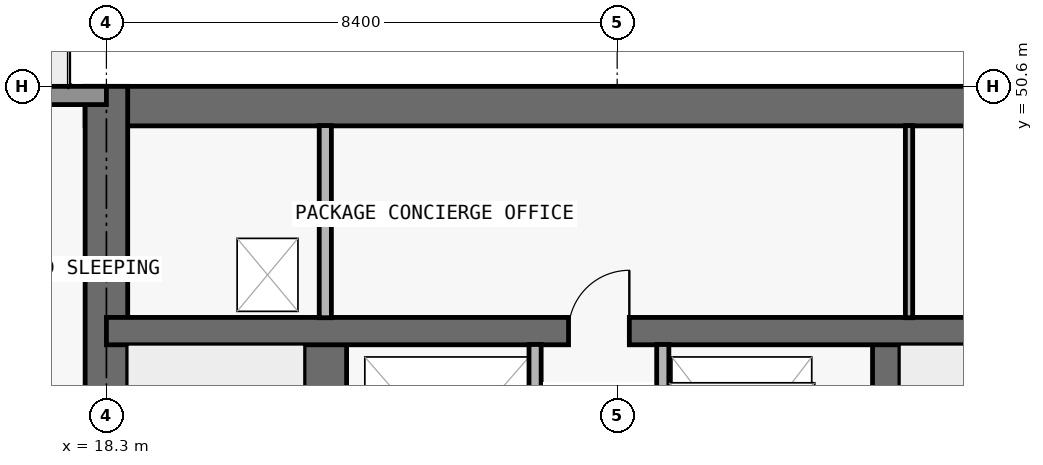
"""IFC4 building model, lengths in metres.
Left out: names, types, materials, properties, quantities, classifications, styles, units other than length and angle.
Written with IfcOpenShell. Run it as: python <this file> out.ifc"""

import sys

from ifc_helpers import new_model, si_unit, direction, frame, frame_2d, origin, place, context, subcontext, project, spatial, rectangle, extrude, element, fill, save


model = new_model("IFC4")
c1 = context("Model", 3, precision=1e-05, world=origin(), true_north=direction((0.0, 1.0)))
c2 = subcontext(c1, "Body", "Model", "MODEL_VIEW")
j1 = project(units=[si_unit("LENGTHUNIT", "METRE"), si_unit("PLANEANGLEUNIT", "RADIAN")], contexts=[c1])
p1 = place(None, origin())
s1 = spatial("IfcSite", under=j1, at=p1, CompositionType="ELEMENT")
p2 = place(p1, origin())
s2 = spatial("IfcBuilding", under=s1, at=p2, CompositionType="ELEMENT")
p3 = place(p2, frame((0.0, 0.0, 204.9)))
s3 = spatial("IfcBuildingStorey", under=s2, at=p3, CompositionType="ELEMENT", Elevation=204.9)
p4 = place(p3, frame((17.95, 50.275, 0.0), z_axis=(0.0, 0.0, 1.0), x_axis=(1.0, 0.0, 0.0)))
e1 = element("IfcWall", 1, at=p4, inside=s3, PredefinedType="SHEAR", context=c2, shape_type="SweptSolid", body=[
    extrude(rectangle(XDim=41.9, YDim=0.65, at=frame_2d((20.95, 0.0))), origin(), (0.0, 0.0, 1.0), 3.05),
])
p5 = place(p3, frame((18.3, 36.65, 0.0), z_axis=(0.0, 0.0, 1.0), x_axis=(0.0, 1.0, 0.0)))
e2 = element("IfcWall", 2, at=p5, inside=s3, PredefinedType="SHEAR", context=c2, shape_type="SweptSolid", body=[
    extrude(rectangle(XDim=13.95, YDim=0.7, at=frame_2d((6.975, 0.0))), origin(), (0.0, 0.0, 1.0), 3.05),
])
p6 = place(p3, frame((21.9, 37.0, 0.0), z_axis=(0.0, 0.0, 1.0), x_axis=(0.0, 1.0, 0.0)))
e3 = element("IfcWall", 3, at=p6, inside=s3, PredefinedType="SHEAR", context=c2, shape_type="SweptSolid", body=[
    extrude(rectangle(XDim=9.575, YDim=0.7, at=frame_2d((4.788, 0.0))), origin(), (0.0, 0.0, 1.0), 3.05),
])
p7 = place(p6, frame((0.55, 0.0, 0.0)))
e4 = element("IfcOpeningElement", 4, at=p7, cuts=e3, PredefinedType="OPENING", context=c2, shape_type="SweptSolid", body=[
    extrude(rectangle(XDim=1.1, YDim=2.15, at=frame_2d((0.55, 1.075))), frame((0.0, 0.36, 0.0), z_axis=(0.0, -1.0, 0.0), x_axis=(1.0, 0.0, 0.0)), (0.0, 0.0, 1.0), 0.72),
])
p8 = place(p3, frame((31.125, 37.0, 0.0), z_axis=(0.0, 0.0, 1.0), x_axis=(0.0, 1.0, 0.0)))
e5 = element("IfcWall", 5, at=p8, inside=s3, PredefinedType="SHEAR", context=c2, shape_type="SweptSolid", body=[
    extrude(rectangle(XDim=9.575, YDim=0.45, at=frame_2d((4.788, 0.0))), origin(), (0.0, 0.0, 1.0), 3.05),
])
p9 = place(p3, frame((18.3, 46.575, 0.0), z_axis=(0.0, 0.0, 1.0), x_axis=(1.0, 0.0, 0.0)))
e6 = element("IfcWall", 6, at=p9, inside=s3, PredefinedType="SHEAR", context=c2, shape_type="SweptSolid", body=[
    extrude(rectangle(XDim=41.2, YDim=0.45, at=frame_2d((20.6, 0.0))), origin(), (0.0, 0.0, 1.0), 3.05),
])
p10 = place(p9, frame((7.6, 0.0, 0.0)))
e7 = element("IfcOpeningElement", 7, at=p10, cuts=e6, PredefinedType="OPENING", context=c2, shape_type="SweptSolid", body=[
    extrude(rectangle(XDim=1.0, YDim=2.2, at=frame_2d((0.5, 1.1))), frame((0.0, 0.235, 0.0), z_axis=(0.0, -1.0, 0.0), x_axis=(1.0, 0.0, 0.0)), (0.0, 0.0, 1.0), 0.47),
])
p11 = place(p9, frame((32.625, 0.0, 0.0)))
e8 = element("IfcOpeningElement", 8, at=p11, cuts=e6, PredefinedType="OPENING", context=c2, shape_type="SweptSolid", body=[
    extrude(rectangle(XDim=1.05, YDim=2.15, at=frame_2d((0.525, 1.075))), frame((0.0, 0.235, 0.0), z_axis=(0.0, -1.0, 0.0), x_axis=(1.0, 0.0, 0.0)), (0.0, 0.0, 1.0), 0.47),
])
p12 = place(p3, frame((10.1, 50.45, 0.0), z_axis=(0.0, 0.0, 1.0), x_axis=(1.0, 0.0, 0.0)))
e9 = element("IfcWall", 9, at=p12, inside=s3, PredefinedType="STANDARD", context=c2, shape_type="SweptSolid", body=[
    extrude(rectangle(XDim=8.2, YDim=0.3, at=frame_2d((4.1, 0.0))), origin(), (0.0, 0.0, 1.0), 3.05),
])
p13 = place(p12, frame((3.1, 0.0, 0.0)))
e10 = element("IfcOpeningElement", 10, at=p13, cuts=e9, PredefinedType="OPENING", context=c2, shape_type="SweptSolid", body=[
    extrude(rectangle(XDim=2.0, YDim=2.3, at=frame_2d((1.0, 1.15))), frame((0.0, 0.16, 0.0), z_axis=(0.0, -1.0, 0.0), x_axis=(1.0, 0.0, 0.0)), (0.0, 0.0, 1.0), 0.32),
])
p14 = place(p3, frame((21.9, 46.795, 0.0), z_axis=(0.0, 0.0, 1.0), x_axis=(0.0, 1.0, 0.0)))
e11 = element("IfcWall", 11, at=p14, inside=s3, PredefinedType="PARTITIONING", context=c2, shape_type="SweptSolid", body=[
    extrude(rectangle(XDim=3.16, YDim=0.2, at=frame_2d((1.58, 0.0))), origin(), (0.0, 0.0, 1.0), 3.05),
])
for number, where, z_axis, x_axis in (
    (12, (25.35, 43.17, 0.0), (0.0, 0.0, 1.0), (0.0, 1.0, 0.0)),
    (13, (27.45, 43.17, 0.0), (0.0, 0.0, 1.0), (0.0, 1.0, 0.0)),
):
    element("IfcWall", number, at=place(p3, frame(where, z_axis=z_axis, x_axis=x_axis)), inside=s3, PredefinedType="PARTITIONING", context=c2, shape_type="SweptSolid", body=[
        extrude(rectangle(XDim=3.185, YDim=0.2, at=frame_2d((1.593, 0.0))), origin(), (0.0, 0.0, 1.0), 3.05),
    ])
p15 = place(p3, frame((31.5, 46.795, 0.0), z_axis=(0.0, 0.0, 1.0), x_axis=(0.0, 1.0, 0.0)))
e14 = element("IfcWall", 14, at=p15, inside=s3, PredefinedType="PARTITIONING", context=c2, shape_type="SweptSolid", body=[
    extrude(rectangle(XDim=3.16, YDim=0.12, at=frame_2d((1.58, 0.0))), origin(), (0.0, 0.0, 1.0), 3.05),
])
p16 = place(p10, origin())
e15 = element("IfcDoor", 15, at=p16, inside=s3, OperationType="SINGLE_SWING_RIGHT", PredefinedType="DOOR", context=c2, shape_type="SweptSolid", body=[
    extrude(rectangle(XDim=1.0, YDim=2.2, at=frame_2d((0.5, 1.1))), frame((0.0, 0.025, 0.0), z_axis=(0.0, -1.0, 0.0), x_axis=(1.0, 0.0, 0.0)), (0.0, 0.0, 1.0), 0.05),
])
fill(e7, e15)
save(model, sys.argv[1])
